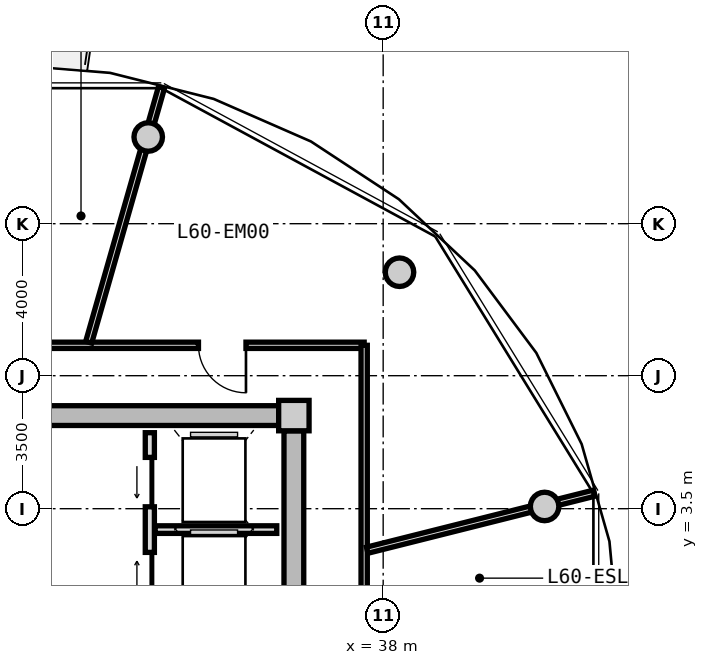
"""IFC4 building model, lengths in metres.
Left out: names, types, materials, properties, quantities, classifications, styles, units other than length and angle.
Written with IfcOpenShell. Run it as: python <this file> out.ifc"""

import sys

from ifc_helpers import new_model, si_unit, direction, frame, frame_2d, origin, origin_2d, place, context, subcontext, project, spatial, rectangle, circle, extrude, source, transform, mapped, element, fill, save


model = new_model("IFC4")
c1 = context("Model", 3, precision=1e-05, world=origin(), true_north=direction((0.0, 1.0)))
c2 = subcontext(c1, "Body", "Model", "MODEL_VIEW")
j1 = project(units=[si_unit("LENGTHUNIT", "METRE"), si_unit("PLANEANGLEUNIT", "RADIAN")], contexts=[c1])
p1 = place(None, origin())
s1 = spatial("IfcSite", under=j1, at=p1, CompositionType="ELEMENT")
p2 = place(p1, origin())
s2 = spatial("IfcBuilding", under=s1, at=p2, CompositionType="ELEMENT")
p3 = place(p2, frame((0.0, 0.0, 193.7)))
s3 = spatial("IfcBuildingStorey", under=s2, at=p3, CompositionType="ELEMENT", Elevation=193.7)
m1 = source(origin(), c2, "Body", "SweptSolid", [
    extrude(rectangle(XDim=0.8, YDim=0.8, at=origin_2d()), origin(), (0.0, 0.0, 1.0), 3.05),
])
p4 = place(p3, frame((35.65, 5.95, 0.0), z_axis=(0.0, 0.0, 1.0), x_axis=(1.0, 0.0, 0.0)))
e1 = element("IfcColumn", 1, at=p4, inside=s3, PredefinedType="COLUMN", context=c2, shape_type="MappedRepresentation", body=[
    mapped(m1, transform((0.0, 0.0, 0.0), x_axis=(1.0, 0.0, 0.0), y_axis=(0.0, 1.0, 0.0), z_axis=(0.0, 0.0, 1.0), scale=1.0)),
])
m2 = source(origin(), c2, "Body", "SweptSolid", [
    extrude(rectangle(XDim=14.5, YDim=0.52, at=frame_2d((7.25, 0.0))), origin(), (0.0, 0.0, 1.0), 2.81),
])
p5 = place(p3, frame((20.75, 5.95, 0.0), z_axis=(0.0, 0.0, 1.0), x_axis=(1.0, 0.0, 0.0)))
e2 = element("IfcWall", 2, at=p5, inside=s3, PredefinedType="SHEAR", context=c2, shape_type="MappedRepresentation", body=[
    mapped(m2, transform((0.0, 0.0, 0.0), x_axis=(1.0, 0.0, 0.0), y_axis=(0.0, 1.0, 0.0), z_axis=(0.0, 0.0, 1.0), scale=1.0)),
])
m3 = source(origin(), c2, "Body", "SweptSolid", [
    extrude(rectangle(XDim=11.1, YDim=0.52, at=frame_2d((5.55, 0.0))), origin(), (0.0, 0.0, 1.0), 2.81),
])
p6 = place(p3, frame((35.65, 5.55, 0.0), z_axis=(0.0, 0.0, 1.0), x_axis=(0.0, -1.0, 0.0)))
e3 = element("IfcWall", 3, at=p6, inside=s3, PredefinedType="SHEAR", context=c2, shape_type="MappedRepresentation", body=[
    mapped(m3, transform((0.0, 0.0, 0.0), x_axis=(1.0, 0.0, 0.0), y_axis=(0.0, 1.0, 0.0), z_axis=(0.0, 0.0, 1.0), scale=1.0)),
])
p7 = place(p6, frame((5.65, 0.0, 0.0)))
e4 = element("IfcOpeningElement", 4, at=p7, cuts=e3, PredefinedType="OPENING", context=c2, shape_type="SweptSolid", body=[
    extrude(rectangle(XDim=1.2, YDim=2.15, at=frame_2d((0.6, 1.075))), frame((0.0, 0.27, 0.0), z_axis=(0.0, -1.0, 0.0), x_axis=(1.0, 0.0, 0.0)), (0.0, 0.0, 1.0), 0.54),
])
m4 = source(origin(), c2, "Body", "SweptSolid", [
    extrude(circle(Radius=0.375, at=origin_2d()), origin(), (0.0, 0.0, 1.0), 3.05),
])
for number, where, z_axis, x_axis in (
    (5, (42.247, 3.559, 0.0), (0.0, 0.0, 1.0), (1.0, 0.0, 0.0)),
    (6, (38.43, 9.723, 0.0), (0.0, 0.0, 1.0), (1.0, 0.0, 0.0)),
    (7, (31.818, 13.281, 0.0), (0.0, 0.0, 1.0), (1.0, 0.0, 0.0)),
):
    element("IfcColumn", number, at=place(p3, frame(where, z_axis=z_axis, x_axis=x_axis)), inside=s3, PredefinedType="COLUMN", context=c2, shape_type="MappedRepresentation", body=[
        mapped(m4, transform((0.0, 0.0, 0.0), x_axis=(1.0, 0.0, 0.0), y_axis=(0.0, 1.0, 0.0), z_axis=(0.0, 0.0, 1.0), scale=1.0)),
    ])
m5 = source(origin(), c2, "Body", "SweptSolid", [
    extrude(rectangle(XDim=5.0, YDim=0.24, at=frame_2d((2.5, 0.0))), origin(), (0.0, 0.0, 1.0), 2.795),
])
p8 = place(p3, frame((31.86, 0.5, 0.0), z_axis=(0.0, 0.0, 1.0), x_axis=(0.0, 1.0, 0.0)))
e8 = element("IfcWall", 8, at=p8, inside=s3, PredefinedType="PARTITIONING", context=c2, shape_type="MappedRepresentation", body=[
    mapped(m5, transform((0.0, 0.0, 0.0), x_axis=(1.0, 0.0, 0.0), y_axis=(0.0, 1.0, 0.0), z_axis=(0.0, 0.0, 1.0), scale=1.0)),
])
p9 = place(p8, frame((3.05, 0.0, 0.0)))
e9 = element("IfcOpeningElement", 9, at=p9, cuts=e8, PredefinedType="OPENING", context=c2, shape_type="SweptSolid", body=[
    extrude(rectangle(XDim=1.3, YDim=2.2, at=frame_2d((0.65, 1.1))), frame((0.0, 0.13, 0.0), z_axis=(0.0, -1.0, 0.0), x_axis=(1.0, 0.0, 0.0)), (0.0, 0.0, 1.0), 0.26),
])
p10 = place(p8, frame((0.55, 0.0, 0.0)))
e10 = element("IfcOpeningElement", 10, at=p10, cuts=e8, PredefinedType="OPENING", context=c2, shape_type="SweptSolid", body=[
    extrude(rectangle(XDim=1.3, YDim=2.2, at=frame_2d((0.65, 1.1))), frame((0.0, 0.13, 0.0), z_axis=(0.0, -1.0, 0.0), x_axis=(1.0, 0.0, 0.0)), (0.0, 0.0, 1.0), 0.26),
])
m6 = source(origin(), c2, "Body", "SweptSolid", [
    extrude(rectangle(XDim=3.2, YDim=0.2, at=frame_2d((1.6, 0.0))), origin(), (0.0, 0.0, 1.0), 2.795),
])
p11 = place(p3, frame((32.0, 2.95, 0.0), z_axis=(0.0, 0.0, 1.0), x_axis=(1.0, 0.0, 0.0)))
e11 = element("IfcWall", 11, at=p11, inside=s3, PredefinedType="PARTITIONING", context=c2, shape_type="MappedRepresentation", body=[
    mapped(m6, transform((0.0, 0.0, 0.0), x_axis=(1.0, 0.0, 0.0), y_axis=(0.0, 1.0, 0.0), z_axis=(0.0, 0.0, 1.0), scale=1.0)),
])
m7 = source(origin(), c2, "Body", "SweptSolid", [
    extrude(rectangle(XDim=8.58, YDim=0.165, at=frame_2d((4.29, 0.0))), origin(), (0.0, 0.0, 1.0), 2.795),
])
p12 = place(p3, frame((28.92, 7.8, 0.0), z_axis=(0.0, 0.0, 1.0), x_axis=(1.0, 0.0, 0.0)))
e12 = element("IfcWall", 12, at=p12, inside=s3, PredefinedType="PARTITIONING", context=c2, shape_type="MappedRepresentation", body=[
    mapped(m7, transform((0.0, 0.0, 0.0), x_axis=(1.0, 0.0, 0.0), y_axis=(0.0, 1.0, 0.0), z_axis=(0.0, 0.0, 1.0), scale=1.0)),
])
p13 = place(p12, frame((4.22, 0.0, 0.0)))
e13 = element("IfcOpeningElement", 13, at=p13, cuts=e12, PredefinedType="OPENING", context=c2, shape_type="SweptSolid", body=[
    extrude(rectangle(XDim=1.25, YDim=2.2, at=frame_2d((0.625, 1.1))), frame((0.0, 0.093, 0.0), z_axis=(0.0, -1.0, 0.0), x_axis=(1.0, 0.0, 0.0)), (0.0, 0.0, 1.0), 0.185),
])
m8 = source(origin(), c2, "Body", "SweptSolid", [
    extrude(rectangle(XDim=6.88, YDim=0.165, at=frame_2d((3.44, 0.0))), origin(), (0.0, 0.0, 1.0), 2.795),
])
p14 = place(p3, frame((37.5, 7.8, 0.0), z_axis=(0.0, 0.0, 1.0), x_axis=(0.0, -1.0, 0.0)))
e14 = element("IfcWall", 14, at=p14, inside=s3, PredefinedType="PARTITIONING", context=c2, shape_type="MappedRepresentation", body=[
    mapped(m8, transform((0.0, 0.0, 0.0), x_axis=(1.0, 0.0, 0.0), y_axis=(0.0, 1.0, 0.0), z_axis=(0.0, 0.0, 1.0), scale=1.0)),
])
m9 = source(origin(), c2, "Body", "SweptSolid", [
    extrude(rectangle(XDim=6.974, YDim=0.165, at=frame_2d((3.487, 0.0))), origin(), (0.0, 0.0, 1.0), 2.395),
])
p15 = place(p3, frame((30.251, 7.88, 0.0), z_axis=(0.0, 0.0, 1.0), x_axis=(0.274707256801, 0.961527910703, 0.0)))
e15 = element("IfcWall", 15, at=p15, inside=s3, PredefinedType="PARTITIONING", context=c2, shape_type="MappedRepresentation", body=[
    mapped(m9, transform((0.0, 0.0, 0.0), x_axis=(1.0, 0.0, 0.0), y_axis=(0.0, 1.0, 0.0), z_axis=(0.0, 0.0, 1.0), scale=1.0)),
])
m10 = source(origin(), c2, "Body", "SweptSolid", [
    extrude(rectangle(XDim=6.157, YDim=0.165, at=frame_2d((3.079, 0.0))), origin(), (0.0, 0.0, 1.0), 2.395),
])
p16 = place(p3, frame((37.58, 2.407, 0.0), z_axis=(0.0, 0.0, 1.0), x_axis=(0.969840867184, 0.243738984038, 0.0)))
e16 = element("IfcWall", 16, at=p16, inside=s3, PredefinedType="PARTITIONING", context=c2, shape_type="MappedRepresentation", body=[
    mapped(m10, transform((0.0, 0.0, 0.0), x_axis=(1.0, 0.0, 0.0), y_axis=(0.0, 1.0, 0.0), z_axis=(0.0, 0.0, 1.0), scale=1.0)),
])
m11 = source(origin(), c2, "Body", "SweptSolid", [
    extrude(rectangle(XDim=1.3, YDim=2.2, at=frame_2d((0.65, 1.1))), frame((0.0, 0.025, 0.0), z_axis=(0.0, -1.0, 0.0), x_axis=(1.0, 0.0, 0.0)), (0.0, 0.0, 1.0), 0.05),
])
p17 = place(p9, origin())
e17 = element("IfcDoor", 17, at=p17, inside=s3, OperationType="SLIDING_TO_LEFT", PredefinedType="DOOR", context=c2, shape_type="MappedRepresentation", body=[
    mapped(m11, transform((0.0, 0.0, 0.0), x_axis=(1.0, 0.0, 0.0), y_axis=(0.0, 1.0, 0.0), z_axis=(0.0, 0.0, 1.0), scale=1.0)),
])
fill(e9, e17)
p18 = place(p10, origin())
e18 = element("IfcDoor", 18, at=p18, inside=s3, OperationType="SLIDING_TO_RIGHT", PredefinedType="DOOR", context=c2, shape_type="MappedRepresentation", body=[
    mapped(m11, transform((0.0, 0.0, 0.0), x_axis=(1.0, 0.0, 0.0), y_axis=(0.0, 1.0, 0.0), z_axis=(0.0, 0.0, 1.0), scale=1.0)),
])
fill(e10, e18)
m12 = source(origin(), c2, "Body", "SweptSolid", [
    extrude(rectangle(XDim=1.25, YDim=2.2, at=frame_2d((0.625, 1.1))), frame((0.0, 0.025, 0.0), z_axis=(0.0, -1.0, 0.0), x_axis=(1.0, 0.0, 0.0)), (0.0, 0.0, 1.0), 0.05),
])
p19 = place(p13, frame((1.25, 0.0, 0.0), z_axis=(0.0, 0.0, 1.0), x_axis=(-1.0, 0.0, 0.0)))
e19 = element("IfcDoor", 19, at=p19, inside=s3, OperationType="SINGLE_SWING_LEFT", PredefinedType="DOOR", context=c2, shape_type="MappedRepresentation", body=[
    mapped(m12, transform((0.0, 0.0, 0.0), x_axis=(1.0, 0.0, 0.0), y_axis=(0.0, 1.0, 0.0), z_axis=(0.0, 0.0, 1.0), scale=1.0)),
])
fill(e13, e19)
save(model, sys.argv[1])
